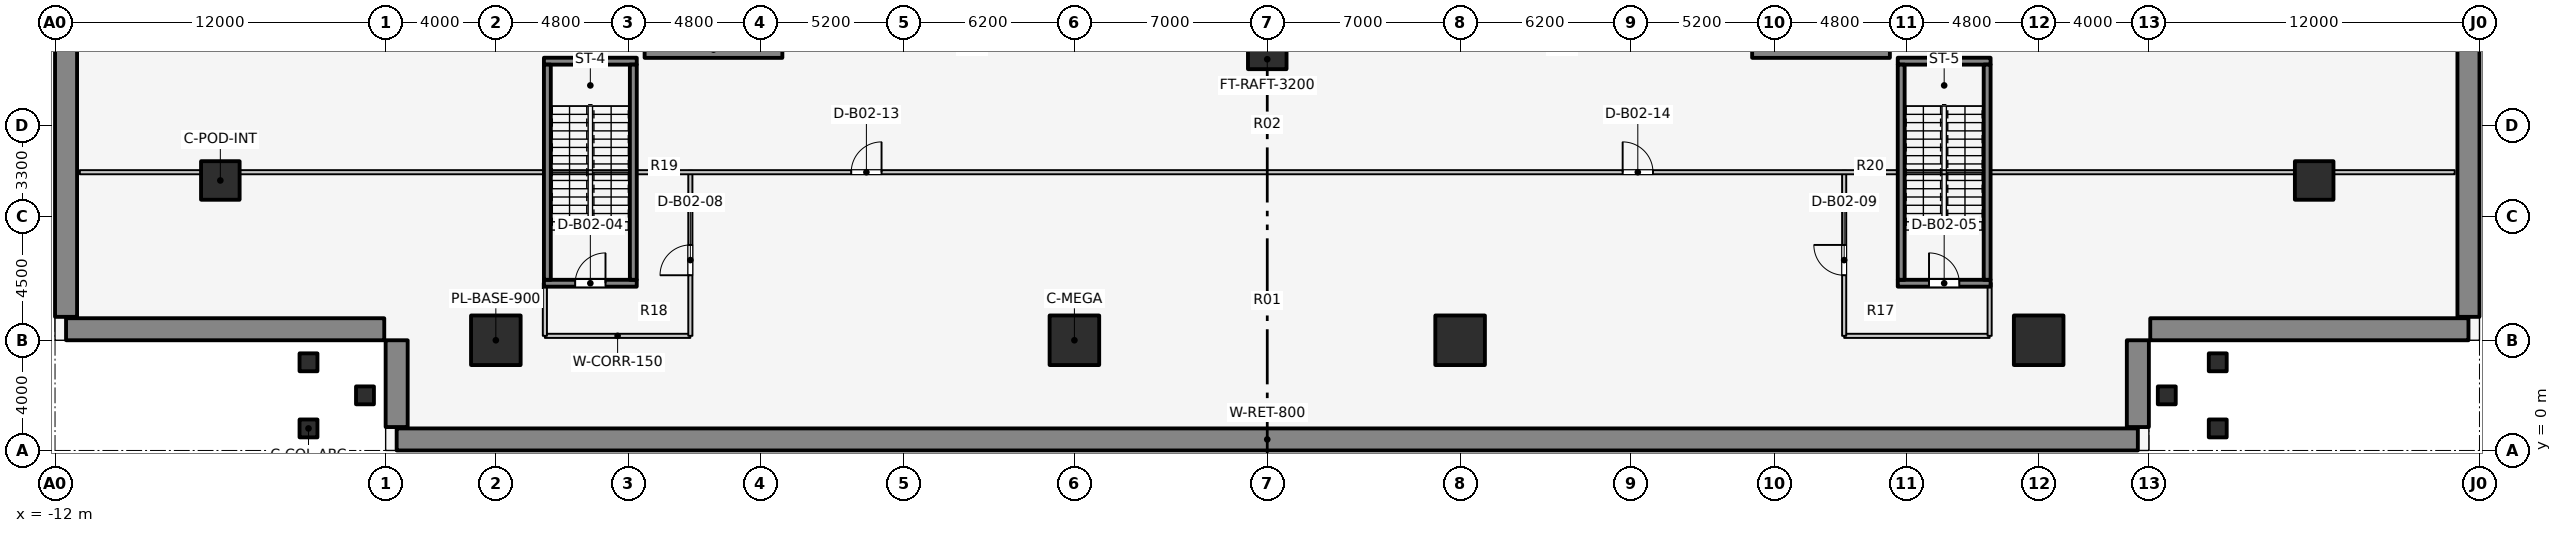
"""IFC4 building model, lengths in metres.
Left out: names, types, materials, properties, quantities, classifications, styles, units other than length and angle.
Written with IfcOpenShell. Run it as: python <this file> out.ifc"""

import sys

from ifc_helpers import new_model, si_unit, direction, frame, frame_2d, origin, origin_2d, place, context, subcontext, project, spatial, rectangle, extrude, element, fill, save


model = new_model("IFC4")
c1 = context("Model", 3, precision=1e-05, world=origin(), true_north=direction((0.0, 1.0)))
c2 = subcontext(c1, "Body", "Model", "MODEL_VIEW")
j1 = project(units=[si_unit("LENGTHUNIT", "METRE"), si_unit("PLANEANGLEUNIT", "RADIAN")], contexts=[c1])
p1 = place(None, origin())
s1 = spatial("IfcSite", under=j1, at=p1, CompositionType="ELEMENT")
p2 = place(p1, origin())
s2 = spatial("IfcBuilding", under=s1, at=p2, CompositionType="ELEMENT")
p3 = place(p2, frame((0.0, 0.0, -10.8)))
s3 = spatial("IfcBuildingStorey", under=s2, at=p3, CompositionType="ELEMENT", Elevation=-10.8)
for number, where, z_axis, x_axis in (
    (1, (-2.8, 0.8, 0.0), (0.0, 0.0, 1.0), (1.0, 0.0, 0.0)),
    (2, (-2.8, 3.2, 0.0), (0.0, 0.0, 1.0), (1.0, 0.0, 0.0)),
    (3, (-0.75, 2.0, 0.0), (0.0, 0.0, 1.0), (1.0, 0.0, 0.0)),
    (4, (66.5, 0.8, 0.0), (0.0, 0.0, 1.0), (1.0, 0.0, 0.0)),
    (5, (66.5, 3.2, 0.0), (0.0, 0.0, 1.0), (1.0, 0.0, 0.0)),
    (6, (64.65, 2.0, 0.0), (0.0, 0.0, 1.0), (1.0, 0.0, 0.0)),
):
    element("IfcColumn", number, at=place(p3, frame(where, z_axis=z_axis, x_axis=x_axis)), inside=s3, PredefinedType="PILASTER", context=c2, shape_type="SweptSolid", body=[
        extrude(rectangle(XDim=0.65, YDim=0.65, at=origin_2d()), origin(), (0.0, 0.0, 1.0), 5.4),
    ])
p4 = place(p3, frame((0.4, 0.4, 0.0), z_axis=(0.0, 0.0, 1.0), x_axis=(1.0, 0.0, 0.0)))
e7 = element("IfcWall", 7, at=p4, inside=s3, PredefinedType="USERDEFINED", context=c2, shape_type="SweptSolid", body=[
    extrude(rectangle(XDim=63.2, YDim=0.8, at=frame_2d((31.6, 0.0))), origin(), (0.0, 0.0, 1.0), 5.4),
])
p5 = place(p3, frame((63.6, 0.85, 0.0), z_axis=(0.0, 0.0, 1.0), x_axis=(0.0, 1.0, 0.0)))
e8 = element("IfcWall", 8, at=p5, inside=s3, PredefinedType="USERDEFINED", context=c2, shape_type="SweptSolid", body=[
    extrude(rectangle(XDim=3.15, YDim=0.8, at=frame_2d((1.575, 0.0))), origin(), (0.0, 0.0, 1.0), 5.4),
])
p6 = place(p3, frame((64.05, 4.4, 0.0), z_axis=(0.0, 0.0, 1.0), x_axis=(1.0, 0.0, 0.0)))
e9 = element("IfcWall", 9, at=p6, inside=s3, PredefinedType="USERDEFINED", context=c2, shape_type="SweptSolid", body=[
    extrude(rectangle(XDim=11.55, YDim=0.8, at=frame_2d((5.775, 0.0))), origin(), (0.0, 0.0, 1.0), 5.4),
])
for number, where, z_axis, x_axis in (
    (10, (75.6, 4.85, 0.0), (0.0, 0.0, 1.0), (0.0, 1.0, 0.0)),
    (11, (-11.6, 15.15, 0.0), (0.0, 0.0, 1.0), (0.0, -1.0, 0.0)),
):
    element("IfcWall", number, at=place(p3, frame(where, z_axis=z_axis, x_axis=x_axis)), inside=s3, PredefinedType="USERDEFINED", context=c2, shape_type="SweptSolid", body=[
        extrude(rectangle(XDim=10.3, YDim=0.8, at=frame_2d((5.15, 0.0))), origin(), (0.0, 0.0, 1.0), 5.4),
    ])
p7 = place(p3, frame((-11.6, 4.4, 0.0), z_axis=(0.0, 0.0, 1.0), x_axis=(1.0, 0.0, 0.0)))
e12 = element("IfcWall", 12, at=p7, inside=s3, PredefinedType="USERDEFINED", context=c2, shape_type="SweptSolid", body=[
    extrude(rectangle(XDim=11.55, YDim=0.8, at=frame_2d((5.775, 0.0))), origin(), (0.0, 0.0, 1.0), 5.4),
])
p8 = place(p3, frame((0.4, 4.0, 0.0), z_axis=(0.0, 0.0, 1.0), x_axis=(0.0, -1.0, 0.0)))
e13 = element("IfcWall", 13, at=p8, inside=s3, PredefinedType="USERDEFINED", context=c2, shape_type="SweptSolid", body=[
    extrude(rectangle(XDim=3.15, YDim=0.8, at=frame_2d((1.575, 0.0))), origin(), (0.0, 0.0, 1.0), 5.4),
])
for number, where, z_axis, x_axis in (
    (14, (9.4, 14.55, 0.0), (0.0, 0.0, 1.0), (1.0, 0.0, 0.0)),
    (15, (49.6, 14.55, 0.0), (0.0, 0.0, 1.0), (1.0, 0.0, 0.0)),
):
    element("IfcWall", number, at=place(p3, frame(where, z_axis=z_axis, x_axis=x_axis)), inside=s3, PredefinedType="SOLIDWALL", context=c2, shape_type="SweptSolid", body=[
        extrude(rectangle(XDim=5.0, YDim=0.6, at=frame_2d((2.5, 0.0))), origin(), (0.0, 0.0, 1.0), 5.4),
    ])
p9 = place(p3, frame((5.745, 6.07, 0.0), z_axis=(0.0, 0.0, 1.0), x_axis=(1.0, 0.0, 0.0)))
e16 = element("IfcWall", 16, at=p9, inside=s3, PredefinedType="SOLIDWALL", context=c2, shape_type="SweptSolid", body=[
    extrude(rectangle(XDim=3.37, YDim=0.25, at=frame_2d((1.685, 0.0))), origin(), (0.0, 0.0, 1.0), 5.4),
])
p10 = place(p9, frame((1.135, 0.0, 0.0)))
e17 = element("IfcOpeningElement", 17, at=p10, cuts=e16, PredefinedType="OPENING", context=c2, shape_type="SweptSolid", body=[
    extrude(rectangle(XDim=1.1, YDim=2.1, at=frame_2d((0.55, 1.05))), frame((0.0, 0.135, 0.0), z_axis=(0.0, -1.0, 0.0), x_axis=(1.0, 0.0, 0.0)), (0.0, 0.0, 1.0), 0.27),
])
p11 = place(p3, frame((5.745, 14.13, 0.0), z_axis=(0.0, 0.0, 1.0), x_axis=(1.0, 0.0, 0.0)))
e18 = element("IfcWall", 18, at=p11, inside=s3, PredefinedType="SOLIDWALL", context=c2, shape_type="SweptSolid", body=[
    extrude(rectangle(XDim=3.37, YDim=0.25, at=frame_2d((1.685, 0.0))), origin(), (0.0, 0.0, 1.0), 5.4),
])
for number, where, z_axis, x_axis in (
    (19, (5.87, 6.195, 0.0), (0.0, 0.0, 1.0), (0.0, 1.0, 0.0)),
    (20, (8.99, 6.195, 0.0), (0.0, 0.0, 1.0), (0.0, 1.0, 0.0)),
):
    element("IfcWall", number, at=place(p3, frame(where, z_axis=z_axis, x_axis=x_axis)), inside=s3, PredefinedType="SOLIDWALL", context=c2, shape_type="SweptSolid", body=[
        extrude(rectangle(XDim=7.81, YDim=0.25, at=frame_2d((3.905, 0.0))), origin(), (0.0, 0.0, 1.0), 5.4),
    ])
p12 = place(p3, frame((54.885, 6.07, 0.0), z_axis=(0.0, 0.0, 1.0), x_axis=(1.0, 0.0, 0.0)))
e21 = element("IfcWall", 21, at=p12, inside=s3, PredefinedType="SOLIDWALL", context=c2, shape_type="SweptSolid", body=[
    extrude(rectangle(XDim=3.37, YDim=0.25, at=frame_2d((1.685, 0.0))), origin(), (0.0, 0.0, 1.0), 5.4),
])
p13 = place(p12, frame((1.135, 0.0, 0.0)))
e22 = element("IfcOpeningElement", 22, at=p13, cuts=e21, PredefinedType="OPENING", context=c2, shape_type="SweptSolid", body=[
    extrude(rectangle(XDim=1.1, YDim=2.1, at=frame_2d((0.55, 1.05))), frame((0.0, 0.135, 0.0), z_axis=(0.0, -1.0, 0.0), x_axis=(1.0, 0.0, 0.0)), (0.0, 0.0, 1.0), 0.27),
])
p14 = place(p3, frame((54.885, 14.13, 0.0), z_axis=(0.0, 0.0, 1.0), x_axis=(1.0, 0.0, 0.0)))
e23 = element("IfcWall", 23, at=p14, inside=s3, PredefinedType="SOLIDWALL", context=c2, shape_type="SweptSolid", body=[
    extrude(rectangle(XDim=3.37, YDim=0.25, at=frame_2d((1.685, 0.0))), origin(), (0.0, 0.0, 1.0), 5.4),
])
for number, where, z_axis, x_axis in (
    (24, (55.01, 6.195, 0.0), (0.0, 0.0, 1.0), (0.0, 1.0, 0.0)),
    (25, (58.13, 6.195, 0.0), (0.0, 0.0, 1.0), (0.0, 1.0, 0.0)),
):
    element("IfcWall", number, at=place(p3, frame(where, z_axis=z_axis, x_axis=x_axis)), inside=s3, PredefinedType="SOLIDWALL", context=c2, shape_type="SweptSolid", body=[
        extrude(rectangle(XDim=7.81, YDim=0.25, at=frame_2d((3.905, 0.0))), origin(), (0.0, 0.0, 1.0), 5.4),
    ])
for number, where, z_axis, x_axis in (
    (26, (-6.0, 9.8, 0.0), (0.0, 0.0, 1.0), (1.0, 0.0, 0.0)),
    (27, (70.0, 9.8, 0.0), (0.0, 0.0, 1.0), (1.0, 0.0, 0.0)),
):
    element("IfcColumn", number, at=place(p3, frame(where, z_axis=z_axis, x_axis=x_axis)), inside=s3, PredefinedType="COLUMN", context=c2, shape_type="SweptSolid", body=[
        extrude(rectangle(XDim=1.4, YDim=1.4, at=origin_2d()), origin(), (0.0, 0.0, 1.0), 5.4),
    ])
for number, where, z_axis, x_axis in (
    (28, (4.0, 4.0, 0.0), (0.0, 0.0, 1.0), (1.0, 0.0, 0.0)),
    (29, (25.0, 4.0, 0.0), (0.0, 0.0, 1.0), (1.0, 0.0, 0.0)),
    (30, (39.0, 4.0, 0.0), (0.0, 0.0, 1.0), (1.0, 0.0, 0.0)),
    (31, (60.0, 4.0, 0.0), (0.0, 0.0, 1.0), (1.0, 0.0, 0.0)),
):
    element("IfcColumn", number, at=place(p3, frame(where, z_axis=z_axis, x_axis=x_axis)), inside=s3, PredefinedType="COLUMN", context=c2, shape_type="SweptSolid", body=[
        extrude(rectangle(XDim=1.8, YDim=1.8, at=origin_2d()), origin(), (0.0, 0.0, 1.0), 5.4),
    ])
p15 = place(p3, frame((32.0, 14.54, 0.0), z_axis=(0.0, 0.0, 1.0), x_axis=(1.0, 0.0, 0.0)))
e32 = element("IfcColumn", 32, at=p15, inside=s3, PredefinedType="COLUMN", context=c2, shape_type="SweptSolid", body=[
    extrude(rectangle(XDim=1.4, YDim=1.4, at=origin_2d()), origin(), (0.0, 0.0, 1.0), 5.4),
])
p16 = place(p3, frame((5.78, 4.16, 0.0), z_axis=(0.0, 0.0, 1.0), x_axis=(1.0, 0.0, 0.0)))
e33 = element("IfcWall", 33, at=p16, inside=s3, PredefinedType="PARTITIONING", context=c2, shape_type="SweptSolid", body=[
    extrude(rectangle(XDim=5.28, YDim=0.15, at=frame_2d((2.64, 0.0))), origin(), (0.0, 0.0, 1.0), 4.1),
])
p17 = place(p3, frame((5.78, 4.16, 0.0), z_axis=(0.0, 0.0, 1.0), x_axis=(0.0, 1.0, 0.0)))
e34 = element("IfcWall", 34, at=p17, inside=s3, PredefinedType="PARTITIONING", context=c2, shape_type="SweptSolid", body=[
    extrude(rectangle(XDim=1.92, YDim=0.15, at=frame_2d((0.96, 0.0))), origin(), (0.0, 0.0, 1.0), 4.1),
])
p18 = place(p3, frame((11.06, 4.16, 0.0), z_axis=(0.0, 0.0, 1.0), x_axis=(0.0, 1.0, 0.0)))
e35 = element("IfcWall", 35, at=p18, inside=s3, PredefinedType="PARTITIONING", context=c2, shape_type="SweptSolid", body=[
    extrude(rectangle(XDim=5.99, YDim=0.15, at=frame_2d((2.995, 0.0))), origin(), (0.0, 0.0, 1.0), 4.1),
])
p19 = place(p18, frame((2.2, 0.0, 0.0)))
e36 = element("IfcOpeningElement", 36, at=p19, cuts=e35, PredefinedType="OPENING", context=c2, shape_type="SweptSolid", body=[
    extrude(rectangle(XDim=1.1, YDim=2.1, at=frame_2d((0.55, 1.05))), frame((0.0, 0.085, 0.0), z_axis=(0.0, -1.0, 0.0), x_axis=(1.0, 0.0, 0.0)), (0.0, 0.0, 1.0), 0.17),
])
p20 = place(p3, frame((52.94, 4.16, 0.0), z_axis=(0.0, 0.0, 1.0), x_axis=(1.0, 0.0, 0.0)))
e37 = element("IfcWall", 37, at=p20, inside=s3, PredefinedType="PARTITIONING", context=c2, shape_type="SweptSolid", body=[
    extrude(rectangle(XDim=5.28, YDim=0.15, at=frame_2d((2.64, 0.0))), origin(), (0.0, 0.0, 1.0), 4.1),
])
p21 = place(p3, frame((58.22, 4.16, 0.0), z_axis=(0.0, 0.0, 1.0), x_axis=(0.0, 1.0, 0.0)))
e38 = element("IfcWall", 38, at=p21, inside=s3, PredefinedType="PARTITIONING", context=c2, shape_type="SweptSolid", body=[
    extrude(rectangle(XDim=1.92, YDim=0.15, at=frame_2d((0.96, 0.0))), origin(), (0.0, 0.0, 1.0), 4.1),
])
p22 = place(p3, frame((52.94, 4.16, 0.0), z_axis=(0.0, 0.0, 1.0), x_axis=(0.0, 1.0, 0.0)))
e39 = element("IfcWall", 39, at=p22, inside=s3, PredefinedType="PARTITIONING", context=c2, shape_type="SweptSolid", body=[
    extrude(rectangle(XDim=5.99, YDim=0.15, at=frame_2d((2.995, 0.0))), origin(), (0.0, 0.0, 1.0), 4.1),
])
p23 = place(p22, frame((2.2, 0.0, 0.0)))
e40 = element("IfcOpeningElement", 40, at=p23, cuts=e39, PredefinedType="OPENING", context=c2, shape_type="SweptSolid", body=[
    extrude(rectangle(XDim=1.1, YDim=2.1, at=frame_2d((0.55, 1.05))), frame((0.0, 0.085, 0.0), z_axis=(0.0, -1.0, 0.0), x_axis=(1.0, 0.0, 0.0)), (0.0, 0.0, 1.0), 0.17),
])
p24 = place(p3, frame((-11.1, 10.1, 0.0), z_axis=(0.0, 0.0, 1.0), x_axis=(1.0, 0.0, 0.0)))
e41 = element("IfcWall", 41, at=p24, inside=s3, PredefinedType="PARTITIONING", context=c2, shape_type="SweptSolid", body=[
    extrude(rectangle(XDim=86.2, YDim=0.15, at=frame_2d((43.1, 0.0))), origin(), (0.0, 0.0, 1.0), 4.1),
])
p25 = place(p24, frame((28.0, 0.0, 0.0)))
e42 = element("IfcOpeningElement", 42, at=p25, cuts=e41, PredefinedType="OPENING", context=c2, shape_type="SweptSolid", body=[
    extrude(rectangle(XDim=1.1, YDim=2.1, at=frame_2d((0.55, 1.05))), frame((0.0, 0.085, 0.0), z_axis=(0.0, -1.0, 0.0), x_axis=(1.0, 0.0, 0.0)), (0.0, 0.0, 1.0), 0.17),
])
p26 = place(p24, frame((56.0, 0.0, 0.0)))
e43 = element("IfcOpeningElement", 43, at=p26, cuts=e41, PredefinedType="OPENING", context=c2, shape_type="SweptSolid", body=[
    extrude(rectangle(XDim=1.1, YDim=2.1, at=frame_2d((0.55, 1.05))), frame((0.0, 0.085, 0.0), z_axis=(0.0, -1.0, 0.0), x_axis=(1.0, 0.0, 0.0)), (0.0, 0.0, 1.0), 0.17),
])
p27 = place(p10, origin())
e44 = element("IfcDoor", 44, at=p27, inside=s3, OperationType="SINGLE_SWING_RIGHT", PredefinedType="DOOR", context=c2, shape_type="SweptSolid", body=[
    extrude(rectangle(XDim=1.1, YDim=2.1, at=frame_2d((0.55, 1.05))), frame((0.0, 0.025, 0.0), z_axis=(0.0, -1.0, 0.0), x_axis=(1.0, 0.0, 0.0)), (0.0, 0.0, 1.0), 0.05),
])
fill(e17, e44)
p28 = place(p13, origin())
e45 = element("IfcDoor", 45, at=p28, inside=s3, OperationType="SINGLE_SWING_LEFT", PredefinedType="DOOR", context=c2, shape_type="SweptSolid", body=[
    extrude(rectangle(XDim=1.1, YDim=2.1, at=frame_2d((0.55, 1.05))), frame((0.0, 0.025, 0.0), z_axis=(0.0, -1.0, 0.0), x_axis=(1.0, 0.0, 0.0)), (0.0, 0.0, 1.0), 0.05),
])
fill(e22, e45)
p29 = place(p19, origin())
e46 = element("IfcDoor", 46, at=p29, inside=s3, OperationType="SINGLE_SWING_LEFT", PredefinedType="DOOR", context=c2, shape_type="SweptSolid", body=[
    extrude(rectangle(XDim=1.1, YDim=2.1, at=frame_2d((0.55, 1.05))), frame((0.0, 0.025, 0.0), z_axis=(0.0, -1.0, 0.0), x_axis=(1.0, 0.0, 0.0)), (0.0, 0.0, 1.0), 0.05),
])
fill(e36, e46)
p30 = place(p23, origin())
e47 = element("IfcDoor", 47, at=p30, inside=s3, OperationType="SINGLE_SWING_RIGHT", PredefinedType="DOOR", context=c2, shape_type="SweptSolid", body=[
    extrude(rectangle(XDim=1.1, YDim=2.1, at=frame_2d((0.55, 1.05))), frame((0.0, 0.025, 0.0), z_axis=(0.0, -1.0, 0.0), x_axis=(1.0, 0.0, 0.0)), (0.0, 0.0, 1.0), 0.05),
])
fill(e40, e47)
p31 = place(p25, origin())
e48 = element("IfcDoor", 48, at=p31, inside=s3, OperationType="SINGLE_SWING_RIGHT", PredefinedType="DOOR", context=c2, shape_type="SweptSolid", body=[
    extrude(rectangle(XDim=1.1, YDim=2.1, at=frame_2d((0.55, 1.05))), frame((0.0, 0.025, 0.0), z_axis=(0.0, -1.0, 0.0), x_axis=(1.0, 0.0, 0.0)), (0.0, 0.0, 1.0), 0.05),
])
fill(e42, e48)
p32 = place(p26, origin())
e49 = element("IfcDoor", 49, at=p32, inside=s3, OperationType="SINGLE_SWING_LEFT", PredefinedType="DOOR", context=c2, shape_type="SweptSolid", body=[
    extrude(rectangle(XDim=1.1, YDim=2.1, at=frame_2d((0.55, 1.05))), frame((0.0, 0.025, 0.0), z_axis=(0.0, -1.0, 0.0), x_axis=(1.0, 0.0, 0.0)), (0.0, 0.0, 1.0), 0.05),
])
fill(e43, e49)
save(model, sys.argv[1])
